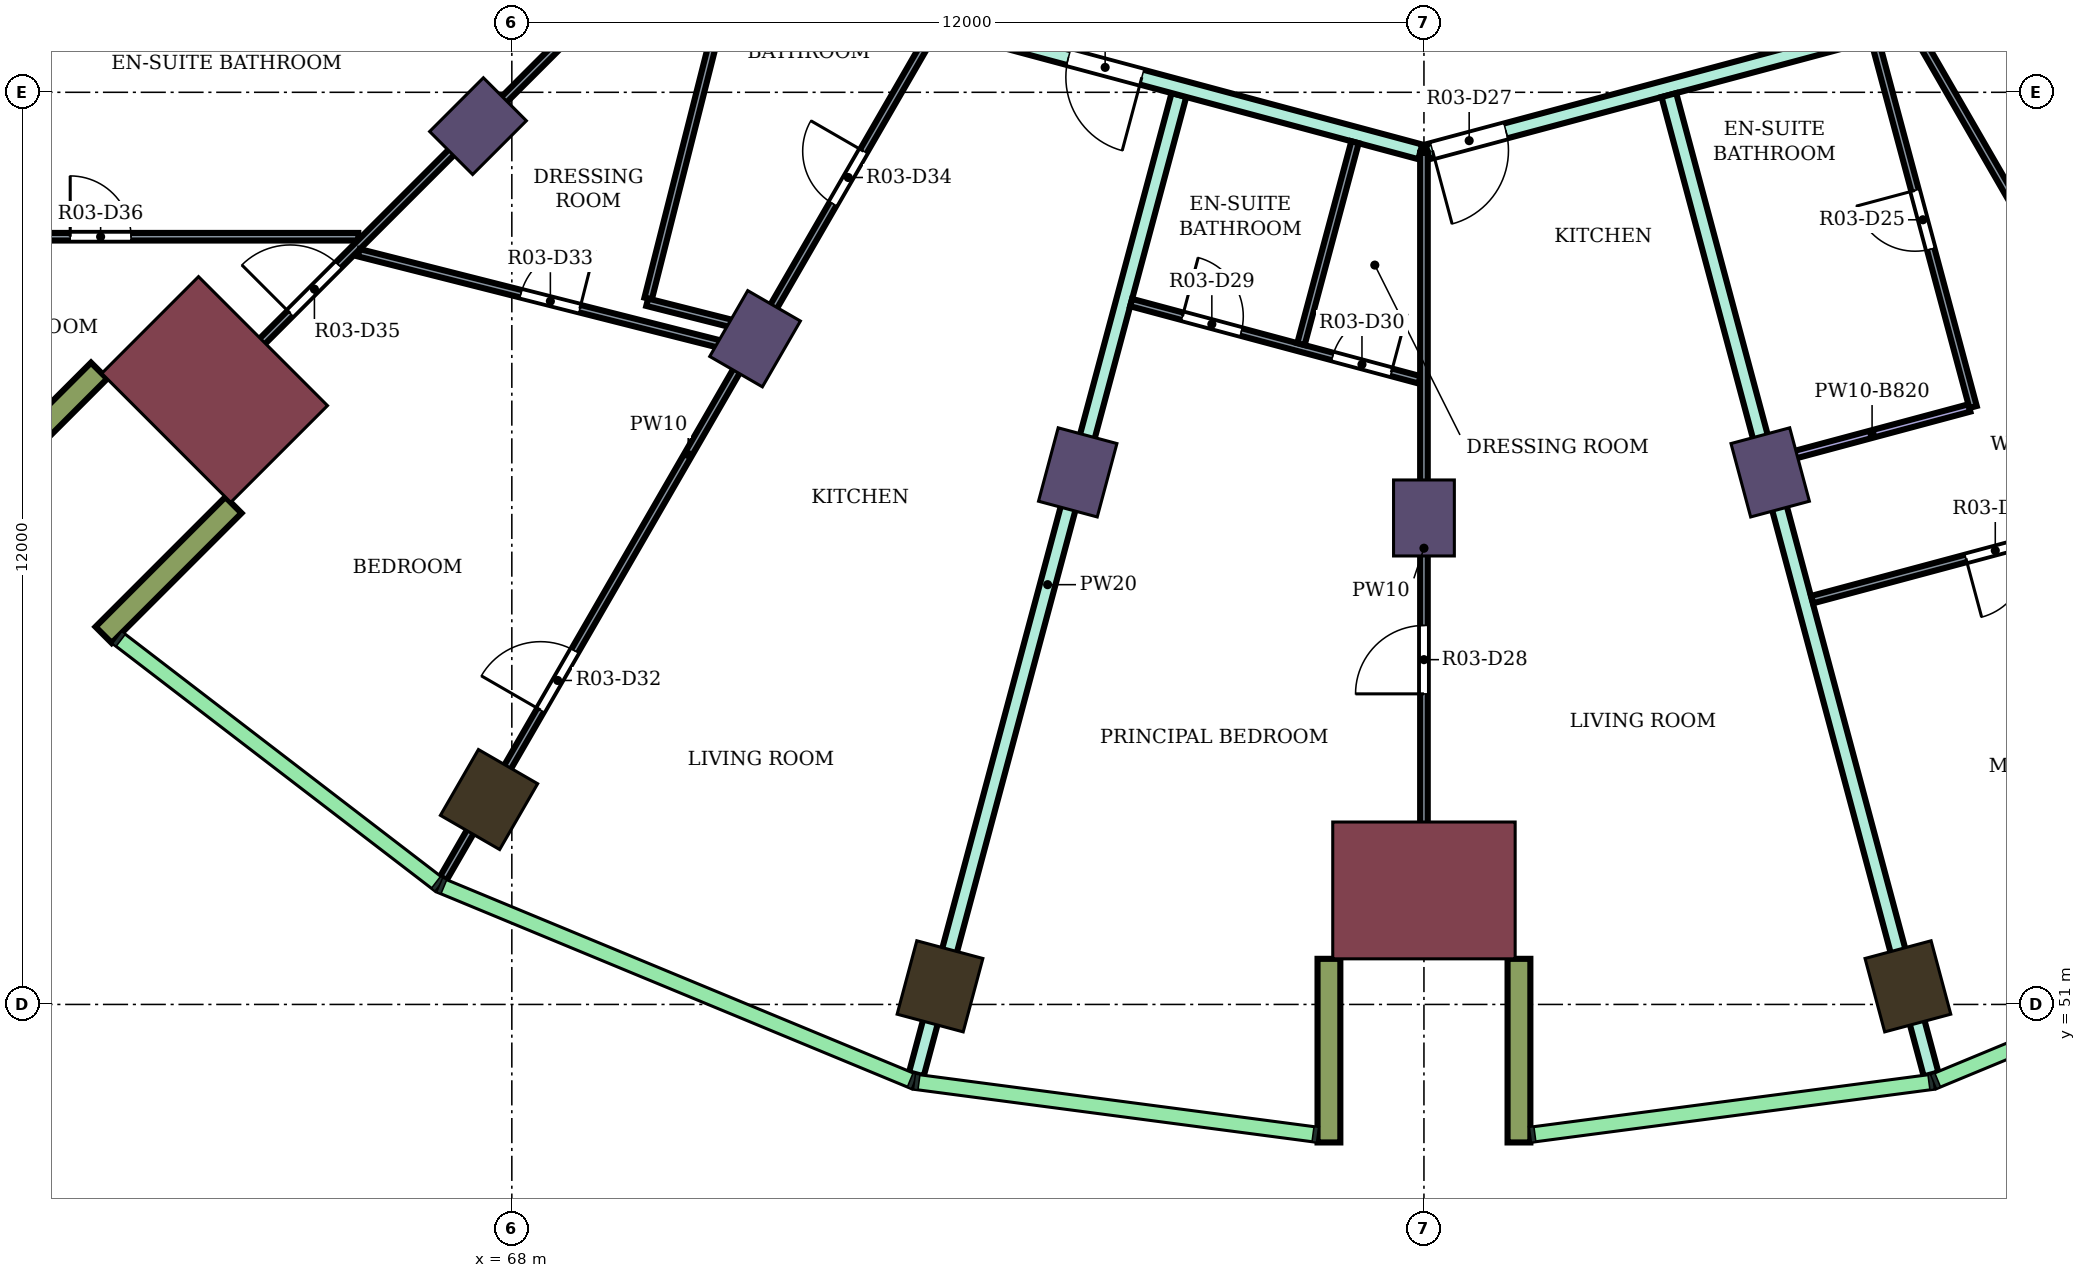
"""IFC4 building model, lengths in metres.
Left out: names, types, materials, properties, quantities, classifications, styles, units other than length and angle.
Written with IfcOpenShell. Run it as: python <this file> out.ifc"""

import sys

from ifc_helpers import new_model, si_unit, direction, frame, frame_2d, origin, origin_2d, place, context, subcontext, project, spatial, rectangle, extrude, element, fill, save


model = new_model("IFC4")
c1 = context("Model", 3, precision=1e-05, world=origin(), true_north=direction((0.0, 1.0)))
c2 = subcontext(c1, "Body", "Model", "MODEL_VIEW")
j1 = project(units=[si_unit("LENGTHUNIT", "METRE"), si_unit("PLANEANGLEUNIT", "RADIAN")], contexts=[c1])
p1 = place(None, origin())
s1 = spatial("IfcSite", under=j1, at=p1, CompositionType="ELEMENT")
p2 = place(p1, origin())
s2 = spatial("IfcBuilding", under=s1, at=p2, CompositionType="ELEMENT")
p3 = place(p2, frame((0.0, 0.0, 186.4)))
s3 = spatial("IfcBuildingStorey", under=s2, at=p3, CompositionType="ELEMENT", Elevation=186.4)
for number, where, z_axis, x_axis in (
    (1, (67.7, 53.696, 0.0), (0.0, 0.0, 1.0), (-0.5, -0.866, 0.0)),
    (2, (73.633, 51.238, 0.0), (0.0, 0.0, 1.0), (-0.259, -0.966, 0.0)),
    (3, (86.367, 51.238, 0.0), (0.0, 0.0, 1.0), (0.259, -0.966, 0.0)),
):
    element("IfcColumn", number, at=place(p3, frame(where, z_axis=z_axis, x_axis=x_axis)), inside=s3, PredefinedType="COLUMN", context=c2, shape_type="SweptSolid", body=[
        extrude(rectangle(XDim=1.0, YDim=0.9, at=origin_2d()), origin(), (0.0, 0.0, 1.0), 4.1),
    ])
for number, where, z_axis, x_axis in (
    (4, (67.555, 62.555, 0.0), (0.0, 0.0, 1.0), (-0.707, -0.707, 0.0)),
    (5, (71.2, 59.758, 0.0), (0.0, 0.0, 1.0), (-0.5, -0.866, 0.0)),
    (6, (75.445, 58.0, 0.0), (0.0, 0.0, 1.0), (-0.259, -0.966, 0.0)),
    (7, (80.0, 57.4, 0.0), (0.0, 0.0, 1.0), (0.0, -1.0, 0.0)),
    (8, (84.555, 58.0, 0.0), (0.0, 0.0, 1.0), (0.259, -0.966, 0.0)),
):
    element("IfcColumn", number, at=place(p3, frame(where, z_axis=z_axis, x_axis=x_axis)), inside=s3, PredefinedType="COLUMN", context=c2, shape_type="SweptSolid", body=[
        extrude(rectangle(XDim=1.0, YDim=0.8, at=origin_2d()), origin(), (0.0, 0.0, 1.0), 4.1),
    ])
for number, where, z_axis, x_axis in (
    (9, (64.09, 59.09, 0.0), (0.0, 0.0, 1.0), (-0.707, -0.707, 0.0)),
    (10, (80.0, 52.5, 0.0), (0.0, 0.0, 1.0), (0.0, -1.0, 0.0)),
):
    element("IfcColumn", number, at=place(p3, frame(where, z_axis=z_axis, x_axis=x_axis)), inside=s3, PredefinedType="COLUMN", context=c2, shape_type="SweptSolid", body=[
        extrude(rectangle(XDim=1.8, YDim=2.4, at=origin_2d()), origin(), (0.0, 0.0, 1.0), 4.1),
    ])
for number, where, z_axis, x_axis in (
    (11, (62.57, 59.338, 0.0), (0.0, 0.0, 1.0), (-0.707, -0.707, 0.0)),
    (12, (64.338, 57.57, 0.0), (0.0, 0.0, 1.0), (-0.707, -0.707, 0.0)),
    (13, (78.75, 51.6, 0.0), (0.0, 0.0, 1.0), (0.0, -1.0, 0.0)),
    (14, (81.25, 51.6, 0.0), (0.0, 0.0, 1.0), (0.0, -1.0, 0.0)),
):
    element("IfcWall", number, at=place(p3, frame(where, z_axis=z_axis, x_axis=x_axis)), inside=s3, PredefinedType="NOTDEFINED", context=c2, shape_type="SweptSolid", body=[
        extrude(rectangle(XDim=2.416, YDim=0.3, at=frame_2d((1.208, 0.0))), origin(), (0.0, 0.0, 1.0), 4.1),
    ])
p4 = place(p3, frame((73.322, 50.081, 0.0), z_axis=(0.0, 0.0, 1.0), x_axis=(0.258965725415, 0.965886511481, 0.0)))
e15 = element("IfcWall", 15, at=p4, inside=s3, PredefinedType="PARTITIONING", context=c2, shape_type="SweptSolid", body=[
    extrude(rectangle(XDim=13.338, YDim=0.2, at=frame_2d((6.669, 0.0))), origin(), (0.0, 0.0, 1.0), 3.65),
])
p5 = place(p3, frame((73.947, 63.826, 0.0), z_axis=(0.0, 0.0, 1.0), x_axis=(0.965898432367, -0.258921258979, 0.0)))
e16 = element("IfcWall", 16, at=p5, inside=s3, PredefinedType="PARTITIONING", context=c2, shape_type="SweptSolid", body=[
    extrude(rectangle(XDim=6.217, YDim=0.2, at=frame_2d((3.108, 0.0))), origin(), (0.0, 0.0, 1.0), 3.65),
])
p6 = place(p5, frame((1.424, 0.0, 0.0)))
e17 = element("IfcOpeningElement", 17, at=p6, cuts=e16, PredefinedType="OPENING", context=c2, shape_type="SweptSolid", body=[
    extrude(rectangle(XDim=1.0, YDim=2.1, at=frame_2d((0.5, 1.05))), frame((0.0, 0.11, 0.0), z_axis=(0.0, -1.0, 0.0), x_axis=(1.0, 0.0, 0.0)), (0.0, 0.0, 1.0), 0.22),
])
p7 = place(p3, frame((80.048, 62.217, 0.0), z_axis=(0.0, 0.0, 1.0), x_axis=(0.965967276872, 0.258664299841, 0.0)))
e18 = element("IfcWall", 18, at=p7, inside=s3, PredefinedType="PARTITIONING", context=c2, shape_type="SweptSolid", body=[
    extrude(rectangle(XDim=6.007, YDim=0.2, at=frame_2d((3.003, 0.0))), origin(), (0.0, 0.0, 1.0), 3.65),
])
p8 = place(p7, frame((0.066, 0.0, 0.0)))
e19 = element("IfcOpeningElement", 19, at=p8, cuts=e18, PredefinedType="OPENING", context=c2, shape_type="SweptSolid", body=[
    extrude(rectangle(XDim=1.0, YDim=2.1, at=frame_2d((0.5, 1.05))), frame((0.0, 0.11, 0.0), z_axis=(0.0, -1.0, 0.0), x_axis=(1.0, 0.0, 0.0)), (0.0, 0.0, 1.0), 0.22),
])
p9 = place(p3, frame((83.222, 62.964, 0.0), z_axis=(0.0, 0.0, 1.0), x_axis=(0.25865252128, -0.965970430829, 0.0)))
e20 = element("IfcWall", 20, at=p9, inside=s3, PredefinedType="PARTITIONING", context=c2, shape_type="SweptSolid", body=[
    extrude(rectangle(XDim=13.338, YDim=0.2, at=frame_2d((6.669, 0.0))), origin(), (0.0, 0.0, 1.0), 3.65),
])
p10 = place(p3, frame((58.379, 61.1, 0.0), z_axis=(0.0, 0.0, 1.0), x_axis=(1.0, 0.0, 0.0)))
e21 = element("IfcWall", 21, at=p10, inside=s3, PredefinedType="PARTITIONING", context=c2, shape_type="SweptSolid", body=[
    extrude(rectangle(XDim=7.601, YDim=0.1, at=frame_2d((3.801, 0.0))), origin(), (0.0, 0.0, 1.0), 3.65),
])
p11 = place(p10, frame((3.811, 0.0, 0.0)))
e22 = element("IfcOpeningElement", 22, at=p11, cuts=e21, PredefinedType="OPENING", context=c2, shape_type="SweptSolid", body=[
    extrude(rectangle(XDim=0.8, YDim=2.1, at=frame_2d((0.4, 1.05))), frame((0.0, 0.06, 0.0), z_axis=(0.0, -1.0, 0.0), x_axis=(1.0, 0.0, 0.0)), (0.0, 0.0, 1.0), 0.12),
])
p12 = place(p10, frame((1.075, 0.0, 0.0)))
e23 = element("IfcOpeningElement", 23, at=p12, cuts=e21, PredefinedType="OPENING", context=c2, shape_type="SweptSolid", body=[
    extrude(rectangle(XDim=0.8, YDim=2.1, at=frame_2d((0.4, 1.05))), frame((0.0, 0.06, 0.0), z_axis=(0.0, -1.0, 0.0), x_axis=(1.0, 0.0, 0.0)), (0.0, 0.0, 1.0), 0.12),
])
p13 = place(p3, frame((63.592, 58.6, 0.0), z_axis=(0.0, 0.0, 1.0), x_axis=(0.707272108928, 0.706941414781, 0.0)))
e24 = element("IfcWall", 24, at=p13, inside=s3, PredefinedType="PARTITIONING", context=c2, shape_type="SweptSolid", body=[
    extrude(rectangle(XDim=8.859, YDim=0.1, at=frame_2d((4.43, 0.0))), origin(), (0.0, 0.0, 1.0), 3.65),
])
p14 = place(p13, frame((2.111, 0.0, 0.0)))
e25 = element("IfcOpeningElement", 25, at=p14, cuts=e24, PredefinedType="OPENING", context=c2, shape_type="SweptSolid", body=[
    extrude(rectangle(XDim=0.9, YDim=2.1, at=frame_2d((0.45, 1.05))), frame((0.0, 0.06, 0.0), z_axis=(0.0, -1.0, 0.0), x_axis=(1.0, 0.0, 0.0)), (0.0, 0.0, 1.0), 0.12),
])
p15 = place(p3, frame((65.987, 60.889, 0.0), z_axis=(0.0, 0.0, 1.0), x_axis=(0.969431303535, -0.245362889871, 0.0)))
e26 = element("IfcWall", 26, at=p15, inside=s3, PredefinedType="PARTITIONING", context=c2, shape_type="SweptSolid", body=[
    extrude(rectangle(XDim=5.22, YDim=0.1, at=frame_2d((2.61, 0.0))), origin(), (0.0, 0.0, 1.0), 3.65),
])
p16 = place(p15, frame((2.2, 0.0, 0.0)))
e27 = element("IfcOpeningElement", 27, at=p16, cuts=e26, PredefinedType="OPENING", context=c2, shape_type="SweptSolid", body=[
    extrude(rectangle(XDim=0.8, YDim=2.1, at=frame_2d((0.4, 1.05))), frame((0.0, 0.06, 0.0), z_axis=(0.0, -1.0, 0.0), x_axis=(1.0, 0.0, 0.0)), (0.0, 0.0, 1.0), 0.12),
])
p17 = place(p3, frame((67.099, 52.66, 0.0), z_axis=(0.0, 0.0, 1.0), x_axis=(0.500286442712, 0.865859962834, 0.0)))
e28 = element("IfcWall", 28, at=p17, inside=s3, PredefinedType="PARTITIONING", context=c2, shape_type="SweptSolid", body=[
    extrude(rectangle(XDim=12.876, YDim=0.1, at=frame_2d((6.438, 0.0))), origin(), (0.0, 0.0, 1.0), 3.65),
])
p18 = place(p17, frame((2.556, 0.0, 0.0)))
e29 = element("IfcOpeningElement", 29, at=p18, cuts=e28, PredefinedType="OPENING", context=c2, shape_type="SweptSolid", body=[
    extrude(rectangle(XDim=0.9, YDim=2.1, at=frame_2d((0.45, 1.05))), frame((0.0, 0.06, 0.0), z_axis=(0.0, -1.0, 0.0), x_axis=(1.0, 0.0, 0.0)), (0.0, 0.0, 1.0), 0.12),
])
p19 = place(p17, frame((10.248, 0.0, 0.0)))
e30 = element("IfcOpeningElement", 30, at=p19, cuts=e28, PredefinedType="OPENING", context=c2, shape_type="SweptSolid", body=[
    extrude(rectangle(XDim=0.8, YDim=2.1, at=frame_2d((0.4, 1.05))), frame((0.0, 0.06, 0.0), z_axis=(0.0, -1.0, 0.0), x_axis=(1.0, 0.0, 0.0)), (0.0, 0.0, 1.0), 0.12),
])
p20 = place(p3, frame((69.793, 60.287, 0.0), z_axis=(0.0, 0.0, 1.0), x_axis=(0.245307703654, 0.969445269486, 0.0)))
e31 = element("IfcWall", 31, at=p20, inside=s3, PredefinedType="PARTITIONING", context=c2, shape_type="SweptSolid", body=[
    extrude(rectangle(XDim=4.35, YDim=0.1, at=frame_2d((2.175, 0.0))), origin(), (0.0, 0.0, 1.0), 3.65),
])
p21 = place(p3, frame((69.781, 60.238, 0.0), z_axis=(0.0, 0.0, 1.0), x_axis=(0.969502558328, -0.245081189397, 0.0)))
e32 = element("IfcWall", 32, at=p21, inside=s3, PredefinedType="PARTITIONING", context=c2, shape_type="SweptSolid", body=[
    extrude(rectangle(XDim=1.466, YDim=0.1, at=frame_2d((0.733, 0.0))), origin(), (0.0, 0.0, 1.0), 3.65),
])
p22 = place(p3, frame((76.147, 60.234, 0.0), z_axis=(0.0, 0.0, 1.0), x_axis=(0.965925861199, -0.258818914816, 0.0)))
e33 = element("IfcWall", 33, at=p22, inside=s3, PredefinedType="PARTITIONING", context=c2, shape_type="SweptSolid", body=[
    extrude(rectangle(XDim=3.929, YDim=0.1, at=frame_2d((1.964, 0.0))), origin(), (0.0, 0.0, 1.0), 3.65),
])
p23 = place(p22, frame((0.7, 0.0, 0.0)))
e34 = element("IfcOpeningElement", 34, at=p23, cuts=e33, PredefinedType="OPENING", context=c2, shape_type="SweptSolid", body=[
    extrude(rectangle(XDim=0.8, YDim=2.1, at=frame_2d((0.4, 1.05))), frame((0.0, 0.06, 0.0), z_axis=(0.0, -1.0, 0.0), x_axis=(1.0, 0.0, 0.0)), (0.0, 0.0, 1.0), 0.12),
])
p24 = place(p22, frame((2.745, 0.0, 0.0)))
e35 = element("IfcOpeningElement", 35, at=p24, cuts=e33, PredefinedType="OPENING", context=c2, shape_type="SweptSolid", body=[
    extrude(rectangle(XDim=0.8, YDim=2.1, at=frame_2d((0.4, 1.05))), frame((0.0, 0.06, 0.0), z_axis=(0.0, -1.0, 0.0), x_axis=(1.0, 0.0, 0.0)), (0.0, 0.0, 1.0), 0.12),
])
p25 = place(p3, frame((78.382, 59.687, 0.0), z_axis=(0.0, 0.0, 1.0), x_axis=(0.258629573817, 0.965976575051, 0.0)))
e36 = element("IfcWall", 36, at=p25, inside=s3, PredefinedType="PARTITIONING", context=c2, shape_type="SweptSolid", body=[
    extrude(rectangle(XDim=2.75, YDim=0.1, at=frame_2d((1.375, 0.0))), origin(), (0.0, 0.0, 1.0), 3.65),
])
p26 = place(p3, frame((80.0, 51.8, 0.0), z_axis=(0.0, 0.0, 1.0), x_axis=(0.0, 1.0, 0.0)))
e37 = element("IfcWall", 37, at=p26, inside=s3, PredefinedType="PARTITIONING", context=c2, shape_type="SweptSolid", body=[
    extrude(rectangle(XDim=10.404, YDim=0.1, at=frame_2d((5.202, 0.0))), origin(), (0.0, 0.0, 1.0), 3.65),
])
p27 = place(p26, frame((3.286, 0.0, 0.0)))
e38 = element("IfcOpeningElement", 38, at=p27, cuts=e37, PredefinedType="OPENING", context=c2, shape_type="SweptSolid", body=[
    extrude(rectangle(XDim=0.9, YDim=2.1, at=frame_2d((0.45, 1.05))), frame((0.0, 0.06, 0.0), z_axis=(0.0, -1.0, 0.0), x_axis=(1.0, 0.0, 0.0)), (0.0, 0.0, 1.0), 0.12),
])
p28 = place(p3, frame((84.615, 58.161, 0.0), z_axis=(0.0, 0.0, 1.0), x_axis=(0.965902408875, 0.258906424273, 0.0)))
e39 = element("IfcWall", 39, at=p28, inside=s3, PredefinedType="PARTITIONING", context=c2, shape_type="SweptSolid", body=[
    extrude(rectangle(XDim=2.651, YDim=0.1, at=frame_2d((1.325, 0.0))), origin(), (0.0, 0.0, 1.0), 3.28),
])
p29 = place(p3, frame((85.108, 56.326, 0.0), z_axis=(0.0, 0.0, 1.0), x_axis=(0.965919870225, 0.258841272413, 0.0)))
e40 = element("IfcWall", 40, at=p29, inside=s3, PredefinedType="PARTITIONING", context=c2, shape_type="SweptSolid", body=[
    extrude(rectangle(XDim=5.027, YDim=0.1, at=frame_2d((2.514, 0.0))), origin(), (0.0, 0.0, 1.0), 3.65),
])
p30 = place(p29, frame((2.094, 0.0, 0.0)))
e41 = element("IfcOpeningElement", 41, at=p30, cuts=e40, PredefinedType="OPENING", context=c2, shape_type="SweptSolid", body=[
    extrude(rectangle(XDim=0.8, YDim=2.1, at=frame_2d((0.4, 1.05))), frame((0.0, 0.06, 0.0), z_axis=(0.0, -1.0, 0.0), x_axis=(1.0, 0.0, 0.0)), (0.0, 0.0, 1.0), 0.12),
])
p31 = place(p3, frame((85.904, 63.786, 0.0), z_axis=(0.0, 0.0, 1.0), x_axis=(0.258857329124, -0.965915567303, 0.0)))
e42 = element("IfcWall", 42, at=p31, inside=s3, PredefinedType="PARTITIONING", context=c2, shape_type="SweptSolid", body=[
    extrude(rectangle(XDim=5.1, YDim=0.1, at=frame_2d((2.55, 0.0))), origin(), (0.0, 0.0, 1.0), 3.65),
])
p32 = place(p31, frame((2.15, 0.0, 0.0)))
e43 = element("IfcOpeningElement", 43, at=p32, cuts=e42, PredefinedType="OPENING", context=c2, shape_type="SweptSolid", body=[
    extrude(rectangle(XDim=0.8, YDim=2.1, at=frame_2d((0.4, 1.05))), frame((0.0, 0.06, 0.0), z_axis=(0.0, -1.0, 0.0), x_axis=(1.0, 0.0, 0.0)), (0.0, 0.0, 1.0), 0.12),
])
p33 = place(p3, frame((86.461, 63.81, 0.0), z_axis=(0.0, 0.0, 1.0), x_axis=(0.499911751641, -0.866076348004, 0.0)))
e44 = element("IfcWall", 44, at=p33, inside=s3, PredefinedType="PARTITIONING", context=c2, shape_type="SweptSolid", body=[
    extrude(rectangle(XDim=12.876, YDim=0.1, at=frame_2d((6.438, 0.0))), origin(), (0.0, 0.0, 1.0), 3.65),
])
p34 = place(p33, frame((9.514, 0.0, 0.0)))
e45 = element("IfcOpeningElement", 45, at=p34, cuts=e44, PredefinedType="OPENING", context=c2, shape_type="SweptSolid", body=[
    extrude(rectangle(XDim=0.9, YDim=2.1, at=frame_2d((0.45, 1.05))), frame((0.0, 0.06, 0.0), z_axis=(0.0, -1.0, 0.0), x_axis=(1.0, 0.0, 0.0)), (0.0, 0.0, 1.0), 0.12),
])
p35 = place(p32, frame((0.8, 0.0, 0.0), z_axis=(0.0, 0.0, 1.0), x_axis=(-1.0, 0.0, 0.0)))
e46 = element("IfcDoor", 46, at=p35, inside=s3, OperationType="SINGLE_SWING_RIGHT", PredefinedType="DOOR", context=c2, shape_type="SweptSolid", body=[
    extrude(rectangle(XDim=0.8, YDim=2.1, at=frame_2d((0.4, 1.05))), frame((0.0, 0.025, 0.0), z_axis=(0.0, -1.0, 0.0), x_axis=(1.0, 0.0, 0.0)), (0.0, 0.0, 1.0), 0.05),
])
fill(e43, e46)
p36 = place(p30, frame((0.8, 0.0, 0.0), z_axis=(0.0, 0.0, 1.0), x_axis=(-1.0, 0.0, 0.0)))
e47 = element("IfcDoor", 47, at=p36, inside=s3, OperationType="SINGLE_SWING_RIGHT", PredefinedType="DOOR", context=c2, shape_type="SweptSolid", body=[
    extrude(rectangle(XDim=0.8, YDim=2.1, at=frame_2d((0.4, 1.05))), frame((0.0, 0.025, 0.0), z_axis=(0.0, -1.0, 0.0), x_axis=(1.0, 0.0, 0.0)), (0.0, 0.0, 1.0), 0.05),
])
fill(e41, e47)
p37 = place(p8, frame((1.0, 0.0, 0.0), z_axis=(0.0, 0.0, 1.0), x_axis=(-1.0, 0.0, 0.0)))
e48 = element("IfcDoor", 48, at=p37, inside=s3, OperationType="SINGLE_SWING_RIGHT", PredefinedType="DOOR", context=c2, shape_type="SweptSolid", body=[
    extrude(rectangle(XDim=1.0, YDim=2.1, at=frame_2d((0.5, 1.05))), frame((0.0, 0.025, 0.0), z_axis=(0.0, -1.0, 0.0), x_axis=(1.0, 0.0, 0.0)), (0.0, 0.0, 1.0), 0.05),
])
fill(e19, e48)
p38 = place(p27, origin())
e49 = element("IfcDoor", 49, at=p38, inside=s3, OperationType="SINGLE_SWING_LEFT", PredefinedType="DOOR", context=c2, shape_type="SweptSolid", body=[
    extrude(rectangle(XDim=0.9, YDim=2.1, at=frame_2d((0.45, 1.05))), frame((0.0, 0.025, 0.0), z_axis=(0.0, -1.0, 0.0), x_axis=(1.0, 0.0, 0.0)), (0.0, 0.0, 1.0), 0.05),
])
fill(e38, e49)
p39 = place(p23, origin())
e50 = element("IfcDoor", 50, at=p39, inside=s3, OperationType="SINGLE_SWING_LEFT", PredefinedType="DOOR", context=c2, shape_type="SweptSolid", body=[
    extrude(rectangle(XDim=0.8, YDim=2.1, at=frame_2d((0.4, 1.05))), frame((0.0, 0.025, 0.0), z_axis=(0.0, -1.0, 0.0), x_axis=(1.0, 0.0, 0.0)), (0.0, 0.0, 1.0), 0.05),
])
fill(e34, e50)
p40 = place(p24, origin())
e51 = element("IfcDoor", 51, at=p40, inside=s3, OperationType="SINGLE_SWING_RIGHT", PredefinedType="DOOR", context=c2, shape_type="SweptSolid", body=[
    extrude(rectangle(XDim=0.8, YDim=2.1, at=frame_2d((0.4, 1.05))), frame((0.0, 0.025, 0.0), z_axis=(0.0, -1.0, 0.0), x_axis=(1.0, 0.0, 0.0)), (0.0, 0.0, 1.0), 0.05),
])
fill(e35, e51)
p41 = place(p6, frame((1.0, 0.0, 0.0), z_axis=(0.0, 0.0, 1.0), x_axis=(-1.0, 0.0, 0.0)))
e52 = element("IfcDoor", 52, at=p41, inside=s3, OperationType="SINGLE_SWING_LEFT", PredefinedType="DOOR", context=c2, shape_type="SweptSolid", body=[
    extrude(rectangle(XDim=1.0, YDim=2.1, at=frame_2d((0.5, 1.05))), frame((0.0, 0.025, 0.0), z_axis=(0.0, -1.0, 0.0), x_axis=(1.0, 0.0, 0.0)), (0.0, 0.0, 1.0), 0.05),
])
fill(e17, e52)
p42 = place(p18, origin())
e53 = element("IfcDoor", 53, at=p42, inside=s3, OperationType="SINGLE_SWING_LEFT", PredefinedType="DOOR", context=c2, shape_type="SweptSolid", body=[
    extrude(rectangle(XDim=0.9, YDim=2.1, at=frame_2d((0.45, 1.05))), frame((0.0, 0.025, 0.0), z_axis=(0.0, -1.0, 0.0), x_axis=(1.0, 0.0, 0.0)), (0.0, 0.0, 1.0), 0.05),
])
fill(e29, e53)
p43 = place(p16, origin())
e54 = element("IfcDoor", 54, at=p43, inside=s3, OperationType="SINGLE_SWING_RIGHT", PredefinedType="DOOR", context=c2, shape_type="SweptSolid", body=[
    extrude(rectangle(XDim=0.8, YDim=2.1, at=frame_2d((0.4, 1.05))), frame((0.0, 0.025, 0.0), z_axis=(0.0, -1.0, 0.0), x_axis=(1.0, 0.0, 0.0)), (0.0, 0.0, 1.0), 0.05),
])
fill(e27, e54)
p44 = place(p19, origin())
e55 = element("IfcDoor", 55, at=p44, inside=s3, OperationType="SINGLE_SWING_RIGHT", PredefinedType="DOOR", context=c2, shape_type="SweptSolid", body=[
    extrude(rectangle(XDim=0.8, YDim=2.1, at=frame_2d((0.4, 1.05))), frame((0.0, 0.025, 0.0), z_axis=(0.0, -1.0, 0.0), x_axis=(1.0, 0.0, 0.0)), (0.0, 0.0, 1.0), 0.05),
])
fill(e30, e55)
p45 = place(p14, origin())
e56 = element("IfcDoor", 56, at=p45, inside=s3, OperationType="SINGLE_SWING_LEFT", PredefinedType="DOOR", context=c2, shape_type="SweptSolid", body=[
    extrude(rectangle(XDim=0.9, YDim=2.1, at=frame_2d((0.45, 1.05))), frame((0.0, 0.025, 0.0), z_axis=(0.0, -1.0, 0.0), x_axis=(1.0, 0.0, 0.0)), (0.0, 0.0, 1.0), 0.05),
])
fill(e25, e56)
p46 = place(p11, origin())
e57 = element("IfcDoor", 57, at=p46, inside=s3, OperationType="SINGLE_SWING_LEFT", PredefinedType="DOOR", context=c2, shape_type="SweptSolid", body=[
    extrude(rectangle(XDim=0.8, YDim=2.1, at=frame_2d((0.4, 1.05))), frame((0.0, 0.025, 0.0), z_axis=(0.0, -1.0, 0.0), x_axis=(1.0, 0.0, 0.0)), (0.0, 0.0, 1.0), 0.05),
])
fill(e22, e57)
save(model, sys.argv[1])
